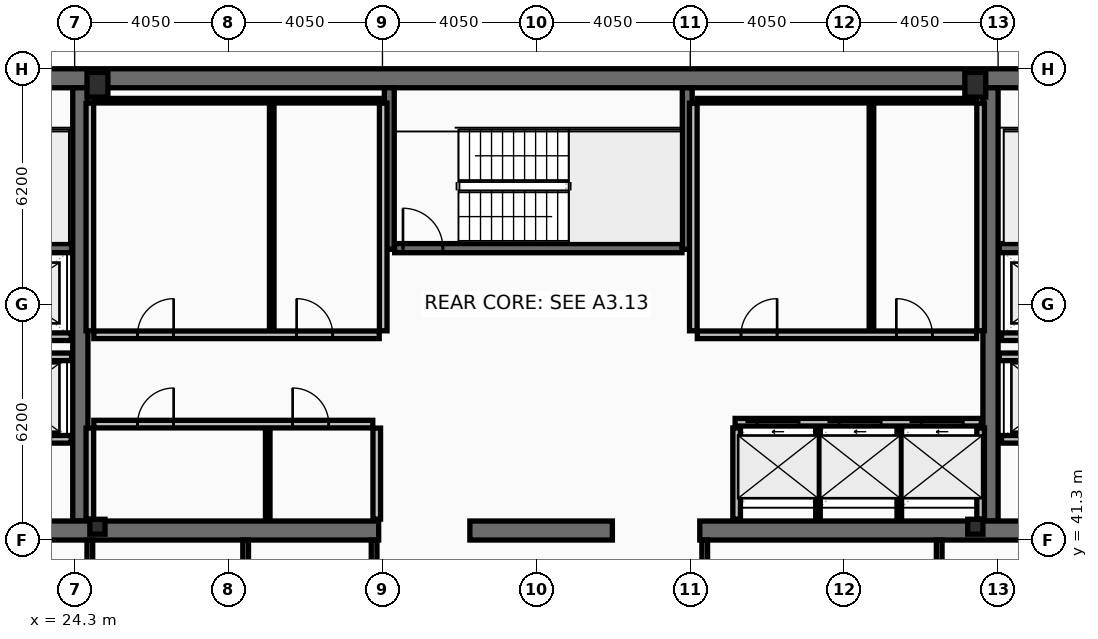
"""IFC4 building model, lengths in metres.
Left out: names, types, materials, properties, quantities, classifications, styles, units other than length and angle.
Written with IfcOpenShell. Run it as: python <this file> out.ifc"""

import sys

from ifc_helpers import new_model, si_unit, direction, frame, frame_2d, origin, origin_2d, place, context, subcontext, project, spatial, rectangle, hollow_rectangle, i_section, extrude, element, fill, save


model = new_model("IFC4")
c1 = context("Model", 3, precision=1e-05, world=origin(), true_north=direction((0.0, 1.0)))
c2 = subcontext(c1, "Body", "Model", "MODEL_VIEW")
j1 = project(units=[si_unit("LENGTHUNIT", "METRE"), si_unit("PLANEANGLEUNIT", "RADIAN")], contexts=[c1])
p1 = place(None, origin())
s1 = spatial("IfcSite", under=j1, at=p1, CompositionType="ELEMENT")
p2 = place(p1, origin())
s2 = spatial("IfcBuilding", under=s1, at=p2, CompositionType="ELEMENT")
p3 = place(p2, frame((0.0, 0.0, 295.0)))
s3 = spatial("IfcBuildingStorey", under=s2, at=p3, CompositionType="ELEMENT", Elevation=295.0)
p4 = place(p3, frame((16.2, 53.45, 0.0), z_axis=(0.0, 0.0, 1.0), x_axis=(1.0, 0.0, 0.0)))
e1 = element("IfcWall", 1, at=p4, inside=s3, PredefinedType="SHEAR", context=c2, shape_type="SweptSolid", body=[
    extrude(rectangle(XDim=40.5, YDim=0.5, at=frame_2d((20.25, 0.0))), origin(), (0.0, 0.0, 1.0), 3.44),
])
for number, where, z_axis, x_axis in (
    (2, (24.45, 41.8, 0.0), (0.0, 0.0, 1.0), (0.0, 1.0, 0.0)),
    (3, (48.4, 41.8, 0.0), (0.0, 0.0, 1.0), (0.0, 1.0, 0.0)),
):
    element("IfcWall", number, at=place(p3, frame(where, z_axis=z_axis, x_axis=x_axis)), inside=s3, PredefinedType="SHEAR", context=c2, shape_type="SweptSolid", body=[
        extrude(rectangle(XDim=11.4, YDim=0.4, at=frame_2d((5.7, 0.0))), origin(), (0.0, 0.0, 1.0), 3.44),
    ])
p5 = place(p3, frame((32.3, 41.55, 0.0), z_axis=(0.0, 0.0, 1.0), x_axis=(-1.0, 0.0, 0.0)))
e4 = element("IfcWall", 4, at=p5, inside=s3, PredefinedType="SHEAR", context=c2, shape_type="SweptSolid", body=[
    extrude(rectangle(XDim=11.45, YDim=0.5, at=frame_2d((5.725, 0.0))), origin(), (0.0, 0.0, 1.0), 3.44),
])
p6 = place(p3, frame((38.45, 41.55, 0.0), z_axis=(0.0, 0.0, 1.0), x_axis=(-1.0, 0.0, 0.0)))
e5 = element("IfcWall", 5, at=p6, inside=s3, PredefinedType="SHEAR", context=c2, shape_type="SweptSolid", body=[
    extrude(rectangle(XDim=3.75, YDim=0.5, at=frame_2d((1.875, 0.0))), origin(), (0.0, 0.0, 1.0), 3.44),
])
p7 = place(p3, frame((52.05, 41.55, 0.0), z_axis=(0.0, 0.0, 1.0), x_axis=(-1.0, 0.0, 0.0)))
e6 = element("IfcWall", 6, at=p7, inside=s3, PredefinedType="SHEAR", context=c2, shape_type="SweptSolid", body=[
    extrude(rectangle(XDim=11.3, YDim=0.5, at=frame_2d((5.65, 0.0))), origin(), (0.0, 0.0, 1.0), 3.44),
])
for number, where, z_axis, x_axis in (
    (7, (32.58, 48.95, 0.0), (0.0, 0.0, 1.0), (0.0, 1.0, 0.0)),
    (8, (40.42, 48.95, 0.0), (0.0, 0.0, 1.0), (0.0, 1.0, 0.0)),
):
    element("IfcWall", number, at=place(p3, frame(where, z_axis=z_axis, x_axis=x_axis)), inside=s3, PredefinedType="SHEAR", context=c2, shape_type="SweptSolid", body=[
        extrude(rectangle(XDim=4.25, YDim=0.26, at=frame_2d((2.125, 0.0))), origin(), (0.0, 0.0, 1.0), 3.44),
    ])
p8 = place(p3, frame((16.7, 48.98, 0.0), z_axis=(0.0, 0.0, 1.0), x_axis=(1.0, 0.0, 0.0)))
e9 = element("IfcWall", 9, at=p8, inside=s3, PredefinedType="SHEAR", context=c2, shape_type="SweptSolid", body=[
    extrude(rectangle(XDim=7.52, YDim=0.24, at=frame_2d((3.76, 0.0))), origin(), (0.0, 0.0, 1.0), 3.44),
])
p9 = place(p8, frame((0.22, 0.0, 0.0)))
e10 = element("IfcOpeningElement", 10, at=p9, cuts=e9, PredefinedType="OPENING", context=c2, shape_type="SweptSolid", body=[
    extrude(rectangle(XDim=1.05, YDim=2.15, at=frame_2d((0.525, 1.075))), frame((0.0, 0.13, 0.0), z_axis=(0.0, -1.0, 0.0), x_axis=(1.0, 0.0, 0.0)), (0.0, 0.0, 1.0), 0.26),
])
p10 = place(p3, frame((48.63, 48.98, 0.0), z_axis=(0.0, 0.0, 1.0), x_axis=(1.0, 0.0, 0.0)))
e11 = element("IfcWall", 11, at=p10, inside=s3, PredefinedType="SHEAR", context=c2, shape_type="SweptSolid", body=[
    extrude(rectangle(XDim=7.57, YDim=0.24, at=frame_2d((3.785, 0.0))), origin(), (0.0, 0.0, 1.0), 3.44),
])
p11 = place(p10, frame((6.3, 0.0, 0.0)))
e12 = element("IfcOpeningElement", 12, at=p11, cuts=e11, PredefinedType="OPENING", context=c2, shape_type="SweptSolid", body=[
    extrude(rectangle(XDim=1.05, YDim=2.15, at=frame_2d((0.525, 1.075))), frame((0.0, 0.13, 0.0), z_axis=(0.0, -1.0, 0.0), x_axis=(1.0, 0.0, 0.0)), (0.0, 0.0, 1.0), 0.26),
])
p12 = place(p3, frame((32.72, 48.98, 0.0), z_axis=(0.0, 0.0, 1.0), x_axis=(1.0, 0.0, 0.0)))
e13 = element("IfcWall", 13, at=p12, inside=s3, PredefinedType="SHEAR", context=c2, shape_type="SweptSolid", body=[
    extrude(rectangle(XDim=7.56, YDim=0.24, at=frame_2d((3.78, 0.0))), origin(), (0.0, 0.0, 1.0), 3.44),
])
p13 = place(p12, frame((0.22, 0.0, 0.0)))
e14 = element("IfcOpeningElement", 14, at=p13, cuts=e13, PredefinedType="OPENING", context=c2, shape_type="SweptSolid", body=[
    extrude(rectangle(XDim=1.05, YDim=2.15, at=frame_2d((0.525, 1.075))), frame((0.0, 0.13, 0.0), z_axis=(0.0, -1.0, 0.0), x_axis=(1.0, 0.0, 0.0)), (0.0, 0.0, 1.0), 0.26),
])
for number, where, z_axis, x_axis in (
    (15, (24.9, 53.28, 0.0), (0.0, 0.0, 1.0), (1.0, 0.0, 0.0)),
    (16, (48.0, 53.28, 0.0), (0.0, 0.0, 1.0), (1.0, 0.0, 0.0)),
):
    element("IfcColumn", number, at=place(p3, frame(where, z_axis=z_axis, x_axis=x_axis)), inside=s3, PredefinedType="COLUMN", context=c2, shape_type="SweptSolid", body=[
        extrude(hollow_rectangle(XDim=0.55, YDim=0.65, WallThickness=0.04, at=origin_2d()), origin(), (0.0, 0.0, 1.0), 3.6),
    ])
for number, where, z_axis, x_axis in (
    (17, (24.9, 41.65, 0.0), (0.0, 0.0, 1.0), (1.0, 0.0, 0.0)),
    (18, (48.0, 41.65, 0.0), (0.0, 0.0, 1.0), (1.0, 0.0, 0.0)),
):
    element("IfcColumn", number, at=place(p3, frame(where, z_axis=z_axis, x_axis=x_axis)), inside=s3, PredefinedType="COLUMN", context=c2, shape_type="SweptSolid", body=[
        extrude(i_section(OverallWidth=0.399, OverallDepth=0.393, WebThickness=0.023, FlangeThickness=0.037, at=origin_2d()), origin(), (0.0, 0.0, 1.0), 3.6),
    ])
p14 = place(p3, frame((41.68, 44.4, 0.0), z_axis=(0.0, 0.0, 1.0), x_axis=(1.0, 0.0, 0.0)))
e19 = element("IfcWall", 19, at=p14, inside=s3, PredefinedType="PARTITIONING", context=c2, shape_type="SweptSolid", body=[
    extrude(rectangle(XDim=6.48, YDim=0.2, at=frame_2d((3.24, 0.0))), origin(), (0.0, 0.0, 1.0), 3.44),
])
p15 = place(p14, frame((0.58, 0.0, 0.0)))
e20 = element("IfcOpeningElement", 20, at=p15, cuts=e19, PredefinedType="OPENING", context=c2, shape_type="SweptSolid", body=[
    extrude(rectangle(XDim=1.1, YDim=2.18, at=frame_2d((0.55, 1.09))), frame((0.0, 0.11, 0.0), z_axis=(0.0, -1.0, 0.0), x_axis=(1.0, 0.0, 0.0)), (0.0, 0.0, 1.0), 0.22),
])
p16 = place(p14, frame((2.74, 0.0, 0.0)))
e21 = element("IfcOpeningElement", 21, at=p16, cuts=e19, PredefinedType="OPENING", context=c2, shape_type="SweptSolid", body=[
    extrude(rectangle(XDim=1.1, YDim=2.18, at=frame_2d((0.55, 1.09))), frame((0.0, 0.11, 0.0), z_axis=(0.0, -1.0, 0.0), x_axis=(1.0, 0.0, 0.0)), (0.0, 0.0, 1.0), 0.22),
])
p17 = place(p14, frame((4.9, 0.0, 0.0)))
e22 = element("IfcOpeningElement", 22, at=p17, cuts=e19, PredefinedType="OPENING", context=c2, shape_type="SweptSolid", body=[
    extrude(rectangle(XDim=1.1, YDim=2.18, at=frame_2d((0.55, 1.09))), frame((0.0, 0.11, 0.0), z_axis=(0.0, -1.0, 0.0), x_axis=(1.0, 0.0, 0.0)), (0.0, 0.0, 1.0), 0.22),
])
p18 = place(p3, frame((51.61, 43.95, 0.0), z_axis=(0.0, 0.0, 1.0), x_axis=(-1.0, 0.0, 0.0)))
e23 = element("IfcWall", 23, at=p18, inside=s3, PredefinedType="PARTITIONING", context=c2, shape_type="SweptSolid", body=[
    extrude(rectangle(XDim=2.92, YDim=0.2, at=frame_2d((1.46, 0.0))), origin(), (0.0, 0.0, 1.0), 3.44),
])
p19 = place(p18, frame((0.81, 0.0, 0.0)))
e24 = element("IfcOpeningElement", 24, at=p19, cuts=e23, PredefinedType="OPENING", context=c2, shape_type="SweptSolid", body=[
    extrude(rectangle(XDim=1.3, YDim=2.18, at=frame_2d((0.65, 1.09))), frame((0.0, 0.11, 0.0), z_axis=(0.0, -1.0, 0.0), x_axis=(1.0, 0.0, 0.0)), (0.0, 0.0, 1.0), 0.22),
])
p20 = place(p3, frame((24.21, 43.95, 0.0), z_axis=(0.0, 0.0, 1.0), x_axis=(-1.0, 0.0, 0.0)))
e25 = element("IfcWall", 25, at=p20, inside=s3, PredefinedType="PARTITIONING", context=c2, shape_type="SweptSolid", body=[
    extrude(rectangle(XDim=2.97, YDim=0.2, at=frame_2d((1.485, 0.0))), origin(), (0.0, 0.0, 1.0), 3.44),
])
p21 = place(p20, frame((0.86, 0.0, 0.0)))
e26 = element("IfcOpeningElement", 26, at=p21, cuts=e25, PredefinedType="OPENING", context=c2, shape_type="SweptSolid", body=[
    extrude(rectangle(XDim=1.3, YDim=2.18, at=frame_2d((0.65, 1.09))), frame((0.0, 0.11, 0.0), z_axis=(0.0, -1.0, 0.0), x_axis=(1.0, 0.0, 0.0)), (0.0, 0.0, 1.0), 0.22),
])
p22 = place(p3, frame((51.61, 46.65, 0.0), z_axis=(0.0, 0.0, 1.0), x_axis=(-1.0, 0.0, 0.0)))
e27 = element("IfcWall", 27, at=p22, inside=s3, PredefinedType="PARTITIONING", context=c2, shape_type="SweptSolid", body=[
    extrude(rectangle(XDim=2.92, YDim=0.2, at=frame_2d((1.46, 0.0))), origin(), (0.0, 0.0, 1.0), 3.44),
])
p23 = place(p22, frame((0.86, 0.0, 0.0)))
e28 = element("IfcOpeningElement", 28, at=p23, cuts=e27, PredefinedType="OPENING", context=c2, shape_type="SweptSolid", body=[
    extrude(rectangle(XDim=1.2, YDim=2.18, at=frame_2d((0.6, 1.09))), frame((0.0, 0.11, 0.0), z_axis=(0.0, -1.0, 0.0), x_axis=(1.0, 0.0, 0.0)), (0.0, 0.0, 1.0), 0.22),
])
p24 = place(p3, frame((24.21, 46.65, 0.0), z_axis=(0.0, 0.0, 1.0), x_axis=(-1.0, 0.0, 0.0)))
e29 = element("IfcWall", 29, at=p24, inside=s3, PredefinedType="PARTITIONING", context=c2, shape_type="SweptSolid", body=[
    extrude(rectangle(XDim=2.97, YDim=0.2, at=frame_2d((1.485, 0.0))), origin(), (0.0, 0.0, 1.0), 3.44),
])
p25 = place(p24, frame((0.91, 0.0, 0.0)))
e30 = element("IfcOpeningElement", 30, at=p25, cuts=e29, PredefinedType="OPENING", context=c2, shape_type="SweptSolid", body=[
    extrude(rectangle(XDim=1.2, YDim=2.18, at=frame_2d((0.6, 1.09))), frame((0.0, 0.11, 0.0), z_axis=(0.0, -1.0, 0.0), x_axis=(1.0, 0.0, 0.0)), (0.0, 0.0, 1.0), 0.22),
])
p26 = place(p3, frame((21.2, 46.12, 0.0), z_axis=(0.0, 0.0, 1.0), x_axis=(1.0, 0.0, 0.0)))
e31 = element("IfcWall", 31, at=p26, inside=s3, PredefinedType="PARTITIONING", context=c2, shape_type="SweptSolid", body=[
    extrude(rectangle(XDim=3.02, YDim=0.2, at=frame_2d((1.51, 0.0))), origin(), (0.0, 0.0, 1.0), 3.44),
])
p27 = place(p3, frame((48.63, 46.12, 0.0), z_axis=(0.0, 0.0, 1.0), x_axis=(1.0, 0.0, 0.0)))
e32 = element("IfcWall", 32, at=p27, inside=s3, PredefinedType="PARTITIONING", context=c2, shape_type="SweptSolid", body=[
    extrude(rectangle(XDim=3.07, YDim=0.2, at=frame_2d((1.535, 0.0))), origin(), (0.0, 0.0, 1.0), 3.44),
])
for number, where, z_axis, x_axis in (
    (33, (24.7, 46.805, 0.0), (0.0, 0.0, 1.0), (0.0, 1.0, 0.0)),
    (34, (32.42, 46.805, 0.0), (0.0, 0.0, 1.0), (0.0, 1.0, 0.0)),
):
    element("IfcWall", number, at=place(p3, frame(where, z_axis=z_axis, x_axis=x_axis)), inside=s3, PredefinedType="PARTITIONING", context=c2, shape_type="SweptSolid", body=[
        extrude(rectangle(XDim=5.99, YDim=0.2, at=frame_2d((2.995, 0.0))), origin(), (0.0, 0.0, 1.0), 3.44),
    ])
p28 = place(p3, frame((24.805, 52.86, 0.0), z_axis=(0.0, 0.0, 1.0), x_axis=(1.0, 0.0, 0.0)))
e35 = element("IfcWall", 35, at=p28, inside=s3, PredefinedType="PARTITIONING", context=c2, shape_type="SweptSolid", body=[
    extrude(rectangle(XDim=7.51, YDim=0.12, at=frame_2d((3.755, 0.0))), origin(), (0.0, 0.0, 1.0), 3.44),
])
p29 = place(p3, frame((29.486, 46.805, 0.0), z_axis=(0.0, 0.0, 1.0), x_axis=(0.0, 1.0, 0.0)))
e36 = element("IfcWall", 36, at=p29, inside=s3, PredefinedType="PARTITIONING", context=c2, shape_type="SweptSolid", body=[
    extrude(rectangle(XDim=5.99, YDim=0.12, at=frame_2d((2.995, 0.0))), origin(), (0.0, 0.0, 1.0), 3.44),
])
p30 = place(p3, frame((24.805, 46.7, 0.0), z_axis=(0.0, 0.0, 1.0), x_axis=(1.0, 0.0, 0.0)))
e37 = element("IfcWall", 37, at=p30, inside=s3, PredefinedType="PARTITIONING", context=c2, shape_type="SweptSolid", body=[
    extrude(rectangle(XDim=7.51, YDim=0.2, at=frame_2d((3.755, 0.0))), origin(), (0.0, 0.0, 1.0), 3.44),
])
p31 = place(p30, frame((1.15, 0.0, 0.0)))
e38 = element("IfcOpeningElement", 38, at=p31, cuts=e37, PredefinedType="OPENING", context=c2, shape_type="SweptSolid", body=[
    extrude(rectangle(XDim=0.95, YDim=2.1, at=frame_2d((0.475, 1.05))), frame((0.0, 0.11, 0.0), z_axis=(0.0, -1.0, 0.0), x_axis=(1.0, 0.0, 0.0)), (0.0, 0.0, 1.0), 0.22),
])
p32 = place(p30, frame((5.336, 0.0, 0.0)))
e39 = element("IfcOpeningElement", 39, at=p32, cuts=e37, PredefinedType="OPENING", context=c2, shape_type="SweptSolid", body=[
    extrude(rectangle(XDim=0.95, YDim=2.1, at=frame_2d((0.475, 1.05))), frame((0.0, 0.11, 0.0), z_axis=(0.0, -1.0, 0.0), x_axis=(1.0, 0.0, 0.0)), (0.0, 0.0, 1.0), 0.22),
])
for number, where, z_axis, x_axis in (
    (40, (24.7, 41.85, 0.0), (0.0, 0.0, 1.0), (0.0, 1.0, 0.0)),
    (41, (32.25, 41.85, 0.0), (0.0, 0.0, 1.0), (0.0, 1.0, 0.0)),
):
    element("IfcWall", number, at=place(p3, frame(where, z_axis=z_axis, x_axis=x_axis)), inside=s3, PredefinedType="PARTITIONING", context=c2, shape_type="SweptSolid", body=[
        extrude(rectangle(XDim=2.395, YDim=0.2, at=frame_2d((1.198, 0.0))), origin(), (0.0, 0.0, 1.0), 3.44),
    ])
p33 = place(p3, frame((29.381, 41.85, 0.0), z_axis=(0.0, 0.0, 1.0), x_axis=(0.0, 1.0, 0.0)))
e42 = element("IfcWall", 42, at=p33, inside=s3, PredefinedType="PARTITIONING", context=c2, shape_type="SweptSolid", body=[
    extrude(rectangle(XDim=2.395, YDim=0.12, at=frame_2d((1.198, 0.0))), origin(), (0.0, 0.0, 1.0), 3.44),
])
p34 = place(p3, frame((24.805, 44.35, 0.0), z_axis=(0.0, 0.0, 1.0), x_axis=(1.0, 0.0, 0.0)))
e43 = element("IfcWall", 43, at=p34, inside=s3, PredefinedType="PARTITIONING", context=c2, shape_type="SweptSolid", body=[
    extrude(rectangle(XDim=7.34, YDim=0.2, at=frame_2d((3.67, 0.0))), origin(), (0.0, 0.0, 1.0), 3.44),
])
p35 = place(p34, frame((1.15, 0.0, 0.0)))
e44 = element("IfcOpeningElement", 44, at=p35, cuts=e43, PredefinedType="OPENING", context=c2, shape_type="SweptSolid", body=[
    extrude(rectangle(XDim=0.95, YDim=2.1, at=frame_2d((0.475, 1.05))), frame((0.0, 0.11, 0.0), z_axis=(0.0, -1.0, 0.0), x_axis=(1.0, 0.0, 0.0)), (0.0, 0.0, 1.0), 0.22),
])
p36 = place(p34, frame((5.231, 0.0, 0.0)))
e45 = element("IfcOpeningElement", 45, at=p36, cuts=e43, PredefinedType="OPENING", context=c2, shape_type="SweptSolid", body=[
    extrude(rectangle(XDim=0.95, YDim=2.1, at=frame_2d((0.475, 1.05))), frame((0.0, 0.11, 0.0), z_axis=(0.0, -1.0, 0.0), x_axis=(1.0, 0.0, 0.0)), (0.0, 0.0, 1.0), 0.22),
])
for number, where, z_axis, x_axis in (
    (46, (40.58, 46.805, 0.0), (0.0, 0.0, 1.0), (0.0, 1.0, 0.0)),
    (47, (48.14, 46.805, 0.0), (0.0, 0.0, 1.0), (0.0, 1.0, 0.0)),
):
    element("IfcWall", number, at=place(p3, frame(where, z_axis=z_axis, x_axis=x_axis)), inside=s3, PredefinedType="PARTITIONING", context=c2, shape_type="SweptSolid", body=[
        extrude(rectangle(XDim=5.99, YDim=0.2, at=frame_2d((2.995, 0.0))), origin(), (0.0, 0.0, 1.0), 3.44),
    ])
p37 = place(p3, frame((40.685, 52.86, 0.0), z_axis=(0.0, 0.0, 1.0), x_axis=(1.0, 0.0, 0.0)))
e48 = element("IfcWall", 48, at=p37, inside=s3, PredefinedType="PARTITIONING", context=c2, shape_type="SweptSolid", body=[
    extrude(rectangle(XDim=7.35, YDim=0.12, at=frame_2d((3.675, 0.0))), origin(), (0.0, 0.0, 1.0), 3.44),
])
p38 = place(p3, frame((45.267, 46.805, 0.0), z_axis=(0.0, 0.0, 1.0), x_axis=(0.0, 1.0, 0.0)))
e49 = element("IfcWall", 49, at=p38, inside=s3, PredefinedType="PARTITIONING", context=c2, shape_type="SweptSolid", body=[
    extrude(rectangle(XDim=5.99, YDim=0.12, at=frame_2d((2.995, 0.0))), origin(), (0.0, 0.0, 1.0), 3.44),
])
p39 = place(p3, frame((40.685, 46.7, 0.0), z_axis=(0.0, 0.0, 1.0), x_axis=(1.0, 0.0, 0.0)))
e50 = element("IfcWall", 50, at=p39, inside=s3, PredefinedType="PARTITIONING", context=c2, shape_type="SweptSolid", body=[
    extrude(rectangle(XDim=7.35, YDim=0.2, at=frame_2d((3.675, 0.0))), origin(), (0.0, 0.0, 1.0), 3.44),
])
p40 = place(p39, frame((1.15, 0.0, 0.0)))
e51 = element("IfcOpeningElement", 51, at=p40, cuts=e50, PredefinedType="OPENING", context=c2, shape_type="SweptSolid", body=[
    extrude(rectangle(XDim=0.95, YDim=2.1, at=frame_2d((0.475, 1.05))), frame((0.0, 0.11, 0.0), z_axis=(0.0, -1.0, 0.0), x_axis=(1.0, 0.0, 0.0)), (0.0, 0.0, 1.0), 0.22),
])
p41 = place(p39, frame((5.237, 0.0, 0.0)))
e52 = element("IfcOpeningElement", 52, at=p41, cuts=e50, PredefinedType="OPENING", context=c2, shape_type="SweptSolid", body=[
    extrude(rectangle(XDim=0.95, YDim=2.1, at=frame_2d((0.475, 1.05))), frame((0.0, 0.11, 0.0), z_axis=(0.0, -1.0, 0.0), x_axis=(1.0, 0.0, 0.0)), (0.0, 0.0, 1.0), 0.22),
])
for number, where, z_axis, x_axis in (
    (53, (41.72, 41.85, 0.0), (0.0, 0.0, 1.0), (0.0, 1.0, 0.0)),
    (54, (48.14, 41.85, 0.0), (0.0, 0.0, 1.0), (0.0, 1.0, 0.0)),
):
    element("IfcWall", number, at=place(p3, frame(where, z_axis=z_axis, x_axis=x_axis)), inside=s3, PredefinedType="PARTITIONING", context=c2, shape_type="SweptSolid", body=[
        extrude(rectangle(XDim=2.4, YDim=0.2, at=frame_2d((1.2, 0.0))), origin(), (0.0, 0.0, 1.0), 3.44),
    ])
for number, where, z_axis, x_axis in (
    (55, (43.86, 41.85, 0.0), (0.0, 0.0, 1.0), (0.0, 1.0, 0.0)),
    (56, (46.0, 41.85, 0.0), (0.0, 0.0, 1.0), (0.0, 1.0, 0.0)),
):
    element("IfcWall", number, at=place(p3, frame(where, z_axis=z_axis, x_axis=x_axis)), inside=s3, PredefinedType="PARTITIONING", context=c2, shape_type="SweptSolid", body=[
        extrude(rectangle(XDim=2.4, YDim=0.12, at=frame_2d((1.2, 0.0))), origin(), (0.0, 0.0, 1.0), 3.44),
    ])
p42 = place(p3, frame((24.7, 38.28, 0.0), z_axis=(0.0, 0.0, 1.0), x_axis=(0.0, 1.0, 0.0)))
e57 = element("IfcWall", 57, at=p42, inside=s3, PredefinedType="PARTITIONING", context=c2, shape_type="SweptSolid", body=[
    extrude(rectangle(XDim=3.02, YDim=0.15, at=frame_2d((1.51, 0.0))), origin(), (0.0, 0.0, 1.0), 2.78),
])
for number, where, z_axis, x_axis in (
    (58, (28.8, 38.28, 0.0), (0.0, 0.0, 1.0), (0.0, 1.0, 0.0)),
    (59, (32.18, 38.28, 0.0), (0.0, 0.0, 1.0), (0.0, 1.0, 0.0)),
    (60, (40.88, 38.28, 0.0), (0.0, 0.0, 1.0), (0.0, 1.0, 0.0)),
    (61, (47.05, 38.28, 0.0), (0.0, 0.0, 1.0), (0.0, 1.0, 0.0)),
):
    element("IfcWall", number, at=place(p3, frame(where, z_axis=z_axis, x_axis=x_axis)), inside=s3, PredefinedType="PARTITIONING", context=c2, shape_type="SweptSolid", body=[
        extrude(rectangle(XDim=3.02, YDim=0.15, at=frame_2d((1.51, 0.0))), origin(), (0.0, 0.0, 1.0), 3.44),
    ])
p43 = place(p13, origin())
e62 = element("IfcDoor", 62, at=p43, inside=s3, OperationType="SINGLE_SWING_LEFT", PredefinedType="DOOR", context=c2, shape_type="SweptSolid", body=[
    extrude(rectangle(XDim=1.05, YDim=2.15, at=frame_2d((0.525, 1.075))), frame((0.0, 0.025, 0.0), z_axis=(0.0, -1.0, 0.0), x_axis=(1.0, 0.0, 0.0)), (0.0, 0.0, 1.0), 0.05),
])
fill(e14, e62)
p44 = place(p15, origin())
e63 = element("IfcDoor", 63, at=p44, inside=s3, OperationType="SLIDING_TO_LEFT", PredefinedType="DOOR", context=c2, shape_type="SweptSolid", body=[
    extrude(rectangle(XDim=1.1, YDim=2.18, at=frame_2d((0.55, 1.09))), frame((0.0, 0.025, 0.0), z_axis=(0.0, -1.0, 0.0), x_axis=(1.0, 0.0, 0.0)), (0.0, 0.0, 1.0), 0.05),
])
fill(e20, e63)
p45 = place(p16, origin())
e64 = element("IfcDoor", 64, at=p45, inside=s3, OperationType="SLIDING_TO_LEFT", PredefinedType="DOOR", context=c2, shape_type="SweptSolid", body=[
    extrude(rectangle(XDim=1.1, YDim=2.18, at=frame_2d((0.55, 1.09))), frame((0.0, 0.025, 0.0), z_axis=(0.0, -1.0, 0.0), x_axis=(1.0, 0.0, 0.0)), (0.0, 0.0, 1.0), 0.05),
])
fill(e21, e64)
p46 = place(p17, origin())
e65 = element("IfcDoor", 65, at=p46, inside=s3, OperationType="SLIDING_TO_LEFT", PredefinedType="DOOR", context=c2, shape_type="SweptSolid", body=[
    extrude(rectangle(XDim=1.1, YDim=2.18, at=frame_2d((0.55, 1.09))), frame((0.0, 0.025, 0.0), z_axis=(0.0, -1.0, 0.0), x_axis=(1.0, 0.0, 0.0)), (0.0, 0.0, 1.0), 0.05),
])
fill(e22, e65)
p47 = place(p31, origin())
e66 = element("IfcDoor", 66, at=p47, inside=s3, OperationType="SINGLE_SWING_RIGHT", PredefinedType="DOOR", context=c2, shape_type="SweptSolid", body=[
    extrude(rectangle(XDim=0.95, YDim=2.1, at=frame_2d((0.475, 1.05))), frame((0.0, 0.025, 0.0), z_axis=(0.0, -1.0, 0.0), x_axis=(1.0, 0.0, 0.0)), (0.0, 0.0, 1.0), 0.05),
])
fill(e38, e66)
p48 = place(p32, origin())
e67 = element("IfcDoor", 67, at=p48, inside=s3, OperationType="SINGLE_SWING_LEFT", PredefinedType="DOOR", context=c2, shape_type="SweptSolid", body=[
    extrude(rectangle(XDim=0.95, YDim=2.1, at=frame_2d((0.475, 1.05))), frame((0.0, 0.025, 0.0), z_axis=(0.0, -1.0, 0.0), x_axis=(1.0, 0.0, 0.0)), (0.0, 0.0, 1.0), 0.05),
])
fill(e39, e67)
p49 = place(p35, origin())
e68 = element("IfcDoor", 68, at=p49, inside=s3, OperationType="SINGLE_SWING_RIGHT", PredefinedType="DOOR", context=c2, shape_type="SweptSolid", body=[
    extrude(rectangle(XDim=0.95, YDim=2.1, at=frame_2d((0.475, 1.05))), frame((0.0, 0.025, 0.0), z_axis=(0.0, -1.0, 0.0), x_axis=(1.0, 0.0, 0.0)), (0.0, 0.0, 1.0), 0.05),
])
fill(e44, e68)
p50 = place(p36, origin())
e69 = element("IfcDoor", 69, at=p50, inside=s3, OperationType="SINGLE_SWING_LEFT", PredefinedType="DOOR", context=c2, shape_type="SweptSolid", body=[
    extrude(rectangle(XDim=0.95, YDim=2.1, at=frame_2d((0.475, 1.05))), frame((0.0, 0.025, 0.0), z_axis=(0.0, -1.0, 0.0), x_axis=(1.0, 0.0, 0.0)), (0.0, 0.0, 1.0), 0.05),
])
fill(e45, e69)
p51 = place(p40, origin())
e70 = element("IfcDoor", 70, at=p51, inside=s3, OperationType="SINGLE_SWING_RIGHT", PredefinedType="DOOR", context=c2, shape_type="SweptSolid", body=[
    extrude(rectangle(XDim=0.95, YDim=2.1, at=frame_2d((0.475, 1.05))), frame((0.0, 0.025, 0.0), z_axis=(0.0, -1.0, 0.0), x_axis=(1.0, 0.0, 0.0)), (0.0, 0.0, 1.0), 0.05),
])
fill(e51, e70)
p52 = place(p41, origin())
e71 = element("IfcDoor", 71, at=p52, inside=s3, OperationType="SINGLE_SWING_LEFT", PredefinedType="DOOR", context=c2, shape_type="SweptSolid", body=[
    extrude(rectangle(XDim=0.95, YDim=2.1, at=frame_2d((0.475, 1.05))), frame((0.0, 0.025, 0.0), z_axis=(0.0, -1.0, 0.0), x_axis=(1.0, 0.0, 0.0)), (0.0, 0.0, 1.0), 0.05),
])
fill(e52, e71)
save(model, sys.argv[1])
